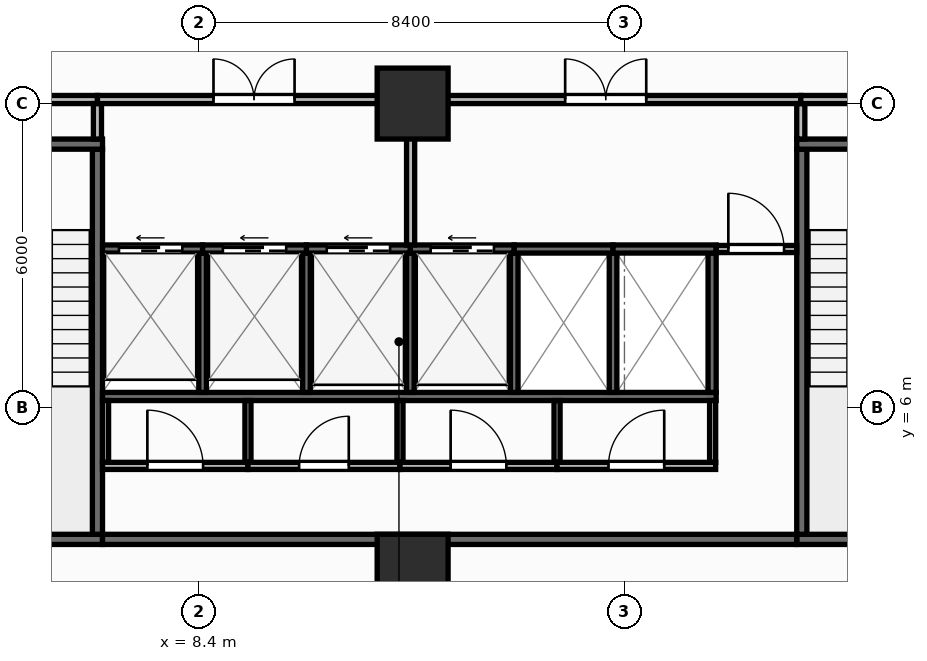
"""IFC4 building model, lengths in metres.
Left out: names, types, materials, properties, quantities, classifications, styles, units other than length and angle.
Written with IfcOpenShell. Run it as: python <this file> out.ifc"""

import sys

from ifc_helpers import new_model, si_unit, direction, frame, frame_2d, origin, origin_2d, place, context, subcontext, project, spatial, rectangle, extrude, element, fill, save


model = new_model("IFC4")
c1 = context("Model", 3, precision=1e-05, world=origin(), true_north=direction((0.0, 1.0)))
c2 = subcontext(c1, "Body", "Model", "MODEL_VIEW")
j1 = project(units=[si_unit("LENGTHUNIT", "METRE"), si_unit("PLANEANGLEUNIT", "RADIAN")], contexts=[c1])
p1 = place(None, origin())
s1 = spatial("IfcSite", under=j1, at=p1, CompositionType="ELEMENT")
p2 = place(p1, origin())
s2 = spatial("IfcBuilding", under=s1, at=p2, CompositionType="ELEMENT")
p3 = place(p2, frame((0.0, 0.0, 4.5)))
s3 = spatial("IfcBuildingStorey", under=s2, at=p3, CompositionType="ELEMENT", Elevation=4.5)
for number, where, z_axis, x_axis in (
    (1, (12.62, 2.8, 0.0), (0.0, 0.0, 1.0), (1.0, 0.0, 0.0)),
    (2, (12.62, 12.0, 0.0), (0.0, 0.0, 1.0), (1.0, 0.0, 0.0)),
):
    element("IfcColumn", number, at=place(p3, frame(where, z_axis=z_axis, x_axis=x_axis)), inside=s3, PredefinedType="COLUMN", context=c2, shape_type="SweptSolid", body=[
        extrude(rectangle(XDim=1.4, YDim=1.4, at=origin_2d()), origin(), (0.0, 0.0, 1.0), 4.5),
    ])
p4 = place(p3, frame((2.8, 3.4, 0.0), z_axis=(0.0, 0.0, 1.0), x_axis=(1.0, 0.0, 0.0)))
e3 = element("IfcWall", 3, at=p4, inside=s3, PredefinedType="SHEAR", context=c2, shape_type="SweptSolid", body=[
    extrude(rectangle(XDim=3.7, YDim=0.2, at=frame_2d((1.85, 0.0))), origin(), (0.0, 0.0, 1.0), 4.25),
])
p5 = place(p3, frame((6.4, 3.5, 0.0), z_axis=(0.0, 0.0, 1.0), x_axis=(0.0, 1.0, 0.0)))
e4 = element("IfcWall", 4, at=p5, inside=s3, PredefinedType="SHEAR", context=c2, shape_type="SweptSolid", body=[
    extrude(rectangle(XDim=7.6, YDim=0.2, at=frame_2d((3.8, 0.0))), origin(), (0.0, 0.0, 1.0), 4.25),
])
p6 = place(p3, frame((2.8, 11.2, 0.0), z_axis=(0.0, 0.0, 1.0), x_axis=(1.0, 0.0, 0.0)))
e5 = element("IfcWall", 5, at=p6, inside=s3, PredefinedType="SHEAR", context=c2, shape_type="SweptSolid", body=[
    extrude(rectangle(XDim=3.7, YDim=0.2, at=frame_2d((1.85, 0.0))), origin(), (0.0, 0.0, 1.0), 4.25),
])
p7 = place(p6, frame((1.2, 0.0, 0.0)))
e6 = element("IfcOpeningElement", 6, at=p7, cuts=e5, PredefinedType="OPENING", context=c2, shape_type="SweptSolid", body=[
    extrude(rectangle(XDim=1.3, YDim=2.15, at=frame_2d((0.65, 1.075))), frame((0.0, 0.11, 0.0), z_axis=(0.0, -1.0, 0.0), x_axis=(1.0, 0.0, 0.0)), (0.0, 0.0, 1.0), 0.22),
])
p8 = place(p3, frame((20.2, 3.4, 0.0), z_axis=(0.0, 0.0, 1.0), x_axis=(1.0, 0.0, 0.0)))
e7 = element("IfcWall", 7, at=p8, inside=s3, PredefinedType="SHEAR", context=c2, shape_type="SweptSolid", body=[
    extrude(rectangle(XDim=3.7, YDim=0.2, at=frame_2d((1.85, 0.0))), origin(), (0.0, 0.0, 1.0), 4.25),
])
p9 = place(p3, frame((20.3, 3.5, 0.0), z_axis=(0.0, 0.0, 1.0), x_axis=(0.0, 1.0, 0.0)))
e8 = element("IfcWall", 8, at=p9, inside=s3, PredefinedType="SHEAR", context=c2, shape_type="SweptSolid", body=[
    extrude(rectangle(XDim=7.6, YDim=0.2, at=frame_2d((3.8, 0.0))), origin(), (0.0, 0.0, 1.0), 4.25),
])
p10 = place(p3, frame((20.2, 11.2, 0.0), z_axis=(0.0, 0.0, 1.0), x_axis=(1.0, 0.0, 0.0)))
e9 = element("IfcWall", 9, at=p10, inside=s3, PredefinedType="SHEAR", context=c2, shape_type="SweptSolid", body=[
    extrude(rectangle(XDim=3.7, YDim=0.2, at=frame_2d((1.85, 0.0))), origin(), (0.0, 0.0, 1.0), 4.25),
])
p11 = place(p10, frame((1.2, 0.0, 0.0)))
e10 = element("IfcOpeningElement", 10, at=p11, cuts=e9, PredefinedType="OPENING", context=c2, shape_type="SweptSolid", body=[
    extrude(rectangle(XDim=1.3, YDim=2.15, at=frame_2d((0.65, 1.075))), frame((0.0, 0.11, 0.0), z_axis=(0.0, -1.0, 0.0), x_axis=(1.0, 0.0, 0.0)), (0.0, 0.0, 1.0), 0.22),
])
p12 = place(p3, frame((6.5, 3.4, 0.0), z_axis=(0.0, 0.0, 1.0), x_axis=(1.0, 0.0, 0.0)))
e11 = element("IfcWall", 11, at=p12, inside=s3, PredefinedType="SHEAR", context=c2, shape_type="SweptSolid", body=[
    extrude(rectangle(XDim=13.7, YDim=0.2, at=frame_2d((6.85, 0.0))), origin(), (0.0, 0.0, 1.0), 4.25),
])
p13 = place(p3, frame((6.5, 6.22, 0.0), z_axis=(0.0, 0.0, 1.0), x_axis=(1.0, 0.0, 0.0)))
e12 = element("IfcWall", 12, at=p13, inside=s3, PredefinedType="SHEAR", context=c2, shape_type="SweptSolid", body=[
    extrude(rectangle(XDim=12.11, YDim=0.16, at=frame_2d((6.055, 0.0))), origin(), (0.0, 0.0, 1.0), 4.25),
])
p14 = place(p3, frame((18.53, 6.3, 0.0), z_axis=(0.0, 0.0, 1.0), x_axis=(0.0, 1.0, 0.0)))
e13 = element("IfcWall", 13, at=p14, inside=s3, PredefinedType="SHEAR", context=c2, shape_type="SweptSolid", body=[
    extrude(rectangle(XDim=2.75, YDim=0.16, at=frame_2d((1.375, 0.0))), origin(), (0.0, 0.0, 1.0), 4.25),
])
for number, where, z_axis, x_axis in (
    (14, (8.475, 6.3, 0.0), (0.0, 0.0, 1.0), (0.0, 1.0, 0.0)),
    (15, (10.525, 6.3, 0.0), (0.0, 0.0, 1.0), (0.0, 1.0, 0.0)),
    (16, (12.575, 6.3, 0.0), (0.0, 0.0, 1.0), (0.0, 1.0, 0.0)),
    (17, (14.625, 6.3, 0.0), (0.0, 0.0, 1.0), (0.0, 1.0, 0.0)),
    (18, (16.575, 6.3, 0.0), (0.0, 0.0, 1.0), (0.0, 1.0, 0.0)),
):
    element("IfcWall", number, at=place(p3, frame(where, z_axis=z_axis, x_axis=x_axis)), inside=s3, PredefinedType="SHEAR", context=c2, shape_type="SweptSolid", body=[
        extrude(rectangle(XDim=2.75, YDim=0.15, at=frame_2d((1.375, 0.0))), origin(), (0.0, 0.0, 1.0), 4.25),
    ])
p15 = place(p3, frame((6.5, 9.13, 0.0), z_axis=(0.0, 0.0, 1.0), x_axis=(1.0, 0.0, 0.0)))
e19 = element("IfcWall", 19, at=p15, inside=s3, PredefinedType="SHEAR", context=c2, shape_type="SweptSolid", body=[
    extrude(rectangle(XDim=1.975, YDim=0.16, at=frame_2d((0.988, 0.0))), origin(), (0.0, 0.0, 1.0), 4.25),
])
p16 = place(p15, frame((0.325, 0.0, 0.0)))
e20 = element("IfcOpeningElement", 20, at=p16, cuts=e19, PredefinedType="OPENING", context=c2, shape_type="SweptSolid", body=[
    extrude(rectangle(XDim=1.25, YDim=2.15, at=frame_2d((0.625, 1.075))), frame((0.0, 0.09, 0.0), z_axis=(0.0, -1.0, 0.0), x_axis=(1.0, 0.0, 0.0)), (0.0, 0.0, 1.0), 0.18),
])
p17 = place(p3, frame((8.475, 9.13, 0.0), z_axis=(0.0, 0.0, 1.0), x_axis=(1.0, 0.0, 0.0)))
e21 = element("IfcWall", 21, at=p17, inside=s3, PredefinedType="SHEAR", context=c2, shape_type="SweptSolid", body=[
    extrude(rectangle(XDim=2.05, YDim=0.16, at=frame_2d((1.025, 0.0))), origin(), (0.0, 0.0, 1.0), 4.25),
])
p18 = place(p17, frame((0.4, 0.0, 0.0)))
e22 = element("IfcOpeningElement", 22, at=p18, cuts=e21, PredefinedType="OPENING", context=c2, shape_type="SweptSolid", body=[
    extrude(rectangle(XDim=1.25, YDim=2.15, at=frame_2d((0.625, 1.075))), frame((0.0, 0.09, 0.0), z_axis=(0.0, -1.0, 0.0), x_axis=(1.0, 0.0, 0.0)), (0.0, 0.0, 1.0), 0.18),
])
p19 = place(p3, frame((10.525, 9.13, 0.0), z_axis=(0.0, 0.0, 1.0), x_axis=(1.0, 0.0, 0.0)))
e23 = element("IfcWall", 23, at=p19, inside=s3, PredefinedType="SHEAR", context=c2, shape_type="SweptSolid", body=[
    extrude(rectangle(XDim=2.05, YDim=0.16, at=frame_2d((1.025, 0.0))), origin(), (0.0, 0.0, 1.0), 4.25),
])
p20 = place(p19, frame((0.4, 0.0, 0.0)))
e24 = element("IfcOpeningElement", 24, at=p20, cuts=e23, PredefinedType="OPENING", context=c2, shape_type="SweptSolid", body=[
    extrude(rectangle(XDim=1.25, YDim=2.15, at=frame_2d((0.625, 1.075))), frame((0.0, 0.09, 0.0), z_axis=(0.0, -1.0, 0.0), x_axis=(1.0, 0.0, 0.0)), (0.0, 0.0, 1.0), 0.18),
])
p21 = place(p3, frame((12.575, 9.13, 0.0), z_axis=(0.0, 0.0, 1.0), x_axis=(1.0, 0.0, 0.0)))
e25 = element("IfcWall", 25, at=p21, inside=s3, PredefinedType="SHEAR", context=c2, shape_type="SweptSolid", body=[
    extrude(rectangle(XDim=2.05, YDim=0.16, at=frame_2d((1.025, 0.0))), origin(), (0.0, 0.0, 1.0), 4.25),
])
p22 = place(p21, frame((0.4, 0.0, 0.0)))
e26 = element("IfcOpeningElement", 26, at=p22, cuts=e25, PredefinedType="OPENING", context=c2, shape_type="SweptSolid", body=[
    extrude(rectangle(XDim=1.25, YDim=2.15, at=frame_2d((0.625, 1.075))), frame((0.0, 0.09, 0.0), z_axis=(0.0, -1.0, 0.0), x_axis=(1.0, 0.0, 0.0)), (0.0, 0.0, 1.0), 0.18),
])
p23 = place(p3, frame((14.625, 9.13, 0.0), z_axis=(0.0, 0.0, 1.0), x_axis=(1.0, 0.0, 0.0)))
e27 = element("IfcWall", 27, at=p23, inside=s3, PredefinedType="SHEAR", context=c2, shape_type="SweptSolid", body=[
    extrude(rectangle(XDim=1.95, YDim=0.16, at=frame_2d((0.975, 0.0))), origin(), (0.0, 0.0, 1.0), 4.25),
])
p24 = place(p3, frame((16.575, 9.13, 0.0), z_axis=(0.0, 0.0, 1.0), x_axis=(1.0, 0.0, 0.0)))
e28 = element("IfcWall", 28, at=p24, inside=s3, PredefinedType="SHEAR", context=c2, shape_type="SweptSolid", body=[
    extrude(rectangle(XDim=2.035, YDim=0.16, at=frame_2d((1.018, 0.0))), origin(), (0.0, 0.0, 1.0), 4.25),
])
for number, where, z_axis, x_axis in (
    (29, (6.56, 4.92, 0.0), (0.0, 0.0, 1.0), (0.0, 1.0, 0.0)),
    (30, (18.54, 4.92, 0.0), (0.0, 0.0, 1.0), (0.0, 1.0, 0.0)),
):
    element("IfcWall", number, at=place(p3, frame(where, z_axis=z_axis, x_axis=x_axis)), inside=s3, PredefinedType="PARTITIONING", context=c2, shape_type="SweptSolid", body=[
        extrude(rectangle(XDim=1.22, YDim=0.12, at=frame_2d((0.61, 0.0))), origin(), (0.0, 0.0, 1.0), 4.25),
    ])
p25 = place(p3, frame((6.5, 4.85, 0.0), z_axis=(0.0, 0.0, 1.0), x_axis=(1.0, 0.0, 0.0)))
e31 = element("IfcWall", 31, at=p25, inside=s3, PredefinedType="PARTITIONING", context=c2, shape_type="SweptSolid", body=[
    extrude(rectangle(XDim=2.87, YDim=0.14, at=frame_2d((1.435, 0.0))), origin(), (0.0, 0.0, 1.0), 4.25),
])
p26 = place(p25, frame((0.885, 0.0, 0.0)))
e32 = element("IfcOpeningElement", 32, at=p26, cuts=e31, PredefinedType="OPENING", context=c2, shape_type="SweptSolid", body=[
    extrude(rectangle(XDim=1.1, YDim=2.1, at=frame_2d((0.55, 1.05))), frame((0.0, 0.08, 0.0), z_axis=(0.0, -1.0, 0.0), x_axis=(1.0, 0.0, 0.0)), (0.0, 0.0, 1.0), 0.16),
])
p27 = place(p3, frame((9.37, 4.92, 0.0), z_axis=(0.0, 0.0, 1.0), x_axis=(0.0, 1.0, 0.0)))
e33 = element("IfcWall", 33, at=p27, inside=s3, PredefinedType="PARTITIONING", context=c2, shape_type="SweptSolid", body=[
    extrude(rectangle(XDim=1.22, YDim=0.12, at=frame_2d((0.61, 0.0))), origin(), (0.0, 0.0, 1.0), 4.25),
])
p28 = place(p3, frame((9.37, 4.85, 0.0), z_axis=(0.0, 0.0, 1.0), x_axis=(1.0, 0.0, 0.0)))
e34 = element("IfcWall", 34, at=p28, inside=s3, PredefinedType="PARTITIONING", context=c2, shape_type="SweptSolid", body=[
    extrude(rectangle(XDim=3.0, YDim=0.14, at=frame_2d((1.5, 0.0))), origin(), (0.0, 0.0, 1.0), 4.25),
])
p29 = place(p28, frame((1.01, 0.0, 0.0)))
e35 = element("IfcOpeningElement", 35, at=p29, cuts=e34, PredefinedType="OPENING", context=c2, shape_type="SweptSolid", body=[
    extrude(rectangle(XDim=0.98, YDim=2.1, at=frame_2d((0.49, 1.05))), frame((0.0, 0.08, 0.0), z_axis=(0.0, -1.0, 0.0), x_axis=(1.0, 0.0, 0.0)), (0.0, 0.0, 1.0), 0.16),
])
p30 = place(p3, frame((12.37, 4.92, 0.0), z_axis=(0.0, 0.0, 1.0), x_axis=(0.0, 1.0, 0.0)))
e36 = element("IfcWall", 36, at=p30, inside=s3, PredefinedType="PARTITIONING", context=c2, shape_type="SweptSolid", body=[
    extrude(rectangle(XDim=1.22, YDim=0.12, at=frame_2d((0.61, 0.0))), origin(), (0.0, 0.0, 1.0), 4.25),
])
p31 = place(p3, frame((12.37, 4.85, 0.0), z_axis=(0.0, 0.0, 1.0), x_axis=(1.0, 0.0, 0.0)))
e37 = element("IfcWall", 37, at=p31, inside=s3, PredefinedType="PARTITIONING", context=c2, shape_type="SweptSolid", body=[
    extrude(rectangle(XDim=3.1, YDim=0.14, at=frame_2d((1.55, 0.0))), origin(), (0.0, 0.0, 1.0), 4.25),
])
p32 = place(p31, frame((1.0, 0.0, 0.0)))
e38 = element("IfcOpeningElement", 38, at=p32, cuts=e37, PredefinedType="OPENING", context=c2, shape_type="SweptSolid", body=[
    extrude(rectangle(XDim=1.1, YDim=2.1, at=frame_2d((0.55, 1.05))), frame((0.0, 0.08, 0.0), z_axis=(0.0, -1.0, 0.0), x_axis=(1.0, 0.0, 0.0)), (0.0, 0.0, 1.0), 0.16),
])
p33 = place(p3, frame((15.47, 4.92, 0.0), z_axis=(0.0, 0.0, 1.0), x_axis=(0.0, 1.0, 0.0)))
e39 = element("IfcWall", 39, at=p33, inside=s3, PredefinedType="PARTITIONING", context=c2, shape_type="SweptSolid", body=[
    extrude(rectangle(XDim=1.22, YDim=0.12, at=frame_2d((0.61, 0.0))), origin(), (0.0, 0.0, 1.0), 4.25),
])
p34 = place(p3, frame((15.47, 4.85, 0.0), z_axis=(0.0, 0.0, 1.0), x_axis=(1.0, 0.0, 0.0)))
e40 = element("IfcWall", 40, at=p34, inside=s3, PredefinedType="PARTITIONING", context=c2, shape_type="SweptSolid", body=[
    extrude(rectangle(XDim=3.13, YDim=0.14, at=frame_2d((1.565, 0.0))), origin(), (0.0, 0.0, 1.0), 4.25),
])
p35 = place(p34, frame((1.015, 0.0, 0.0)))
e41 = element("IfcOpeningElement", 41, at=p35, cuts=e40, PredefinedType="OPENING", context=c2, shape_type="SweptSolid", body=[
    extrude(rectangle(XDim=1.1, YDim=2.1, at=frame_2d((0.55, 1.05))), frame((0.0, 0.08, 0.0), z_axis=(0.0, -1.0, 0.0), x_axis=(1.0, 0.0, 0.0)), (0.0, 0.0, 1.0), 0.16),
])
p36 = place(p3, frame((18.61, 9.13, 0.0), z_axis=(0.0, 0.0, 1.0), x_axis=(1.0, 0.0, 0.0)))
e42 = element("IfcWall", 42, at=p36, inside=s3, PredefinedType="PARTITIONING", context=c2, shape_type="SweptSolid", body=[
    extrude(rectangle(XDim=1.59, YDim=0.14, at=frame_2d((0.795, 0.0))), origin(), (0.0, 0.0, 1.0), 4.25),
])
p37 = place(p36, frame((0.24, 0.0, 0.0)))
e43 = element("IfcOpeningElement", 43, at=p37, cuts=e42, PredefinedType="OPENING", context=c2, shape_type="SweptSolid", body=[
    extrude(rectangle(XDim=1.1, YDim=2.1, at=frame_2d((0.55, 1.05))), frame((0.0, 0.08, 0.0), z_axis=(0.0, -1.0, 0.0), x_axis=(1.0, 0.0, 0.0)), (0.0, 0.0, 1.0), 0.16),
])
p38 = place(p3, frame((2.8, 12.08, 0.0), z_axis=(0.0, 0.0, 1.0), x_axis=(1.0, 0.0, 0.0)))
e44 = element("IfcWall", 44, at=p38, inside=s3, PredefinedType="PARTITIONING", context=c2, shape_type="SweptSolid", body=[
    extrude(rectangle(XDim=3.6, YDim=0.16, at=frame_2d((1.8, 0.0))), origin(), (0.0, 0.0, 1.0), 3.425),
])
p39 = place(p38, frame((1.0, 0.0, 0.0)))
e45 = element("IfcOpeningElement", 45, at=p39, cuts=e44, PredefinedType="OPENING", context=c2, shape_type="SweptSolid", body=[
    extrude(rectangle(XDim=1.6, YDim=2.05, at=frame_2d((0.8, 1.025))), frame((0.0, 0.09, 0.0), z_axis=(0.0, -1.0, 0.0), x_axis=(1.0, 0.0, 0.0)), (0.0, 0.0, 1.0), 0.18),
])
p40 = place(p3, frame((6.4, 11.3, 0.0), z_axis=(0.0, 0.0, 1.0), x_axis=(0.0, 1.0, 0.0)))
e46 = element("IfcWall", 46, at=p40, inside=s3, PredefinedType="PARTITIONING", context=c2, shape_type="SweptSolid", body=[
    extrude(rectangle(XDim=0.7, YDim=0.16, at=frame_2d((0.35, 0.0))), origin(), (0.0, 0.0, 1.0), 4.25),
])
p41 = place(p3, frame((6.4, 12.08, 0.0), z_axis=(0.0, 0.0, 1.0), x_axis=(1.0, 0.0, 0.0)))
e47 = element("IfcWall", 47, at=p41, inside=s3, PredefinedType="PARTITIONING", context=c2, shape_type="SweptSolid", body=[
    extrude(rectangle(XDim=6.18, YDim=0.16, at=frame_2d((3.09, 0.0))), origin(), (0.0, 0.0, 1.0), 3.425),
])
p42 = place(p41, frame((2.29, 0.0, 0.0)))
e48 = element("IfcOpeningElement", 48, at=p42, cuts=e47, PredefinedType="OPENING", context=c2, shape_type="SweptSolid", body=[
    extrude(rectangle(XDim=1.6, YDim=2.05, at=frame_2d((0.8, 1.025))), frame((0.0, 0.09, 0.0), z_axis=(0.0, -1.0, 0.0), x_axis=(1.0, 0.0, 0.0)), (0.0, 0.0, 1.0), 0.18),
])
p43 = place(p3, frame((12.58, 9.21, 0.0), z_axis=(0.0, 0.0, 1.0), x_axis=(0.0, 1.0, 0.0)))
e49 = element("IfcWall", 49, at=p43, inside=s3, PredefinedType="PARTITIONING", context=c2, shape_type="SweptSolid", body=[
    extrude(rectangle(XDim=2.79, YDim=0.16, at=frame_2d((1.395, 0.0))), origin(), (0.0, 0.0, 1.0), 4.25),
])
p44 = place(p3, frame((12.58, 12.08, 0.0), z_axis=(0.0, 0.0, 1.0), x_axis=(1.0, 0.0, 0.0)))
e50 = element("IfcWall", 50, at=p44, inside=s3, PredefinedType="PARTITIONING", context=c2, shape_type="SweptSolid", body=[
    extrude(rectangle(XDim=7.7, YDim=0.16, at=frame_2d((3.85, 0.0))), origin(), (0.0, 0.0, 1.0), 3.425),
])
p45 = place(p44, frame((3.05, 0.0, 0.0)))
e51 = element("IfcOpeningElement", 51, at=p45, cuts=e50, PredefinedType="OPENING", context=c2, shape_type="SweptSolid", body=[
    extrude(rectangle(XDim=1.6, YDim=2.05, at=frame_2d((0.8, 1.025))), frame((0.0, 0.09, 0.0), z_axis=(0.0, -1.0, 0.0), x_axis=(1.0, 0.0, 0.0)), (0.0, 0.0, 1.0), 0.18),
])
p46 = place(p3, frame((20.28, 11.3, 0.0), z_axis=(0.0, 0.0, 1.0), x_axis=(0.0, 1.0, 0.0)))
e52 = element("IfcWall", 52, at=p46, inside=s3, PredefinedType="PARTITIONING", context=c2, shape_type="SweptSolid", body=[
    extrude(rectangle(XDim=0.7, YDim=0.16, at=frame_2d((0.35, 0.0))), origin(), (0.0, 0.0, 1.0), 4.25),
])
p47 = place(p3, frame((20.28, 12.08, 0.0), z_axis=(0.0, 0.0, 1.0), x_axis=(1.0, 0.0, 0.0)))
e53 = element("IfcWall", 53, at=p47, inside=s3, PredefinedType="PARTITIONING", context=c2, shape_type="SweptSolid", body=[
    extrude(rectangle(XDim=3.62, YDim=0.16, at=frame_2d((1.81, 0.0))), origin(), (0.0, 0.0, 1.0), 3.425),
])
p48 = place(p47, frame((1.01, 0.0, 0.0)))
e54 = element("IfcOpeningElement", 54, at=p48, cuts=e53, PredefinedType="OPENING", context=c2, shape_type="SweptSolid", body=[
    extrude(rectangle(XDim=1.6, YDim=2.05, at=frame_2d((0.8, 1.025))), frame((0.0, 0.09, 0.0), z_axis=(0.0, -1.0, 0.0), x_axis=(1.0, 0.0, 0.0)), (0.0, 0.0, 1.0), 0.18),
])
p49 = place(p16, origin())
e55 = element("IfcDoor", 55, at=p49, inside=s3, OperationType="SLIDING_TO_LEFT", PredefinedType="DOOR", context=c2, shape_type="SweptSolid", body=[
    extrude(rectangle(XDim=1.25, YDim=2.15, at=frame_2d((0.625, 1.075))), frame((0.0, 0.025, 0.0), z_axis=(0.0, -1.0, 0.0), x_axis=(1.0, 0.0, 0.0)), (0.0, 0.0, 1.0), 0.05),
])
fill(e20, e55)
p50 = place(p18, origin())
e56 = element("IfcDoor", 56, at=p50, inside=s3, OperationType="SLIDING_TO_LEFT", PredefinedType="DOOR", context=c2, shape_type="SweptSolid", body=[
    extrude(rectangle(XDim=1.25, YDim=2.15, at=frame_2d((0.625, 1.075))), frame((0.0, 0.025, 0.0), z_axis=(0.0, -1.0, 0.0), x_axis=(1.0, 0.0, 0.0)), (0.0, 0.0, 1.0), 0.05),
])
fill(e22, e56)
p51 = place(p20, origin())
e57 = element("IfcDoor", 57, at=p51, inside=s3, OperationType="SLIDING_TO_LEFT", PredefinedType="DOOR", context=c2, shape_type="SweptSolid", body=[
    extrude(rectangle(XDim=1.25, YDim=2.15, at=frame_2d((0.625, 1.075))), frame((0.0, 0.025, 0.0), z_axis=(0.0, -1.0, 0.0), x_axis=(1.0, 0.0, 0.0)), (0.0, 0.0, 1.0), 0.05),
])
fill(e24, e57)
p52 = place(p22, origin())
e58 = element("IfcDoor", 58, at=p52, inside=s3, OperationType="SLIDING_TO_LEFT", PredefinedType="DOOR", context=c2, shape_type="SweptSolid", body=[
    extrude(rectangle(XDim=1.25, YDim=2.15, at=frame_2d((0.625, 1.075))), frame((0.0, 0.025, 0.0), z_axis=(0.0, -1.0, 0.0), x_axis=(1.0, 0.0, 0.0)), (0.0, 0.0, 1.0), 0.05),
])
fill(e26, e58)
p53 = place(p26, origin())
e59 = element("IfcDoor", 59, at=p53, inside=s3, OperationType="SINGLE_SWING_LEFT", PredefinedType="DOOR", context=c2, shape_type="SweptSolid", body=[
    extrude(rectangle(XDim=1.1, YDim=2.1, at=frame_2d((0.55, 1.05))), frame((0.0, 0.025, 0.0), z_axis=(0.0, -1.0, 0.0), x_axis=(1.0, 0.0, 0.0)), (0.0, 0.0, 1.0), 0.05),
])
fill(e32, e59)
p54 = place(p29, origin())
e60 = element("IfcDoor", 60, at=p54, inside=s3, OperationType="SINGLE_SWING_RIGHT", PredefinedType="DOOR", context=c2, shape_type="SweptSolid", body=[
    extrude(rectangle(XDim=0.98, YDim=2.1, at=frame_2d((0.49, 1.05))), frame((0.0, 0.025, 0.0), z_axis=(0.0, -1.0, 0.0), x_axis=(1.0, 0.0, 0.0)), (0.0, 0.0, 1.0), 0.05),
])
fill(e35, e60)
p55 = place(p32, origin())
e61 = element("IfcDoor", 61, at=p55, inside=s3, OperationType="SINGLE_SWING_LEFT", PredefinedType="DOOR", context=c2, shape_type="SweptSolid", body=[
    extrude(rectangle(XDim=1.1, YDim=2.1, at=frame_2d((0.55, 1.05))), frame((0.0, 0.025, 0.0), z_axis=(0.0, -1.0, 0.0), x_axis=(1.0, 0.0, 0.0)), (0.0, 0.0, 1.0), 0.05),
])
fill(e38, e61)
p56 = place(p35, origin())
e62 = element("IfcDoor", 62, at=p56, inside=s3, OperationType="SINGLE_SWING_RIGHT", PredefinedType="DOOR", context=c2, shape_type="SweptSolid", body=[
    extrude(rectangle(XDim=1.1, YDim=2.1, at=frame_2d((0.55, 1.05))), frame((0.0, 0.025, 0.0), z_axis=(0.0, -1.0, 0.0), x_axis=(1.0, 0.0, 0.0)), (0.0, 0.0, 1.0), 0.05),
])
fill(e41, e62)
p57 = place(p37, origin())
e63 = element("IfcDoor", 63, at=p57, inside=s3, OperationType="SINGLE_SWING_LEFT", PredefinedType="DOOR", context=c2, shape_type="SweptSolid", body=[
    extrude(rectangle(XDim=1.1, YDim=2.1, at=frame_2d((0.55, 1.05))), frame((0.0, 0.025, 0.0), z_axis=(0.0, -1.0, 0.0), x_axis=(1.0, 0.0, 0.0)), (0.0, 0.0, 1.0), 0.05),
])
fill(e43, e63)
p58 = place(p42, origin())
e64 = element("IfcDoor", 64, at=p58, inside=s3, OperationType="DOUBLE_DOOR_SINGLE_SWING", PredefinedType="DOOR", context=c2, shape_type="SweptSolid", body=[
    extrude(rectangle(XDim=1.6, YDim=2.05, at=frame_2d((0.8, 1.025))), frame((0.0, 0.025, 0.0), z_axis=(0.0, -1.0, 0.0), x_axis=(1.0, 0.0, 0.0)), (0.0, 0.0, 1.0), 0.05),
])
fill(e48, e64)
p59 = place(p45, origin())
e65 = element("IfcDoor", 65, at=p59, inside=s3, OperationType="DOUBLE_DOOR_SINGLE_SWING", PredefinedType="DOOR", context=c2, shape_type="SweptSolid", body=[
    extrude(rectangle(XDim=1.6, YDim=2.05, at=frame_2d((0.8, 1.025))), frame((0.0, 0.025, 0.0), z_axis=(0.0, -1.0, 0.0), x_axis=(1.0, 0.0, 0.0)), (0.0, 0.0, 1.0), 0.05),
])
fill(e51, e65)
save(model, sys.argv[1])
